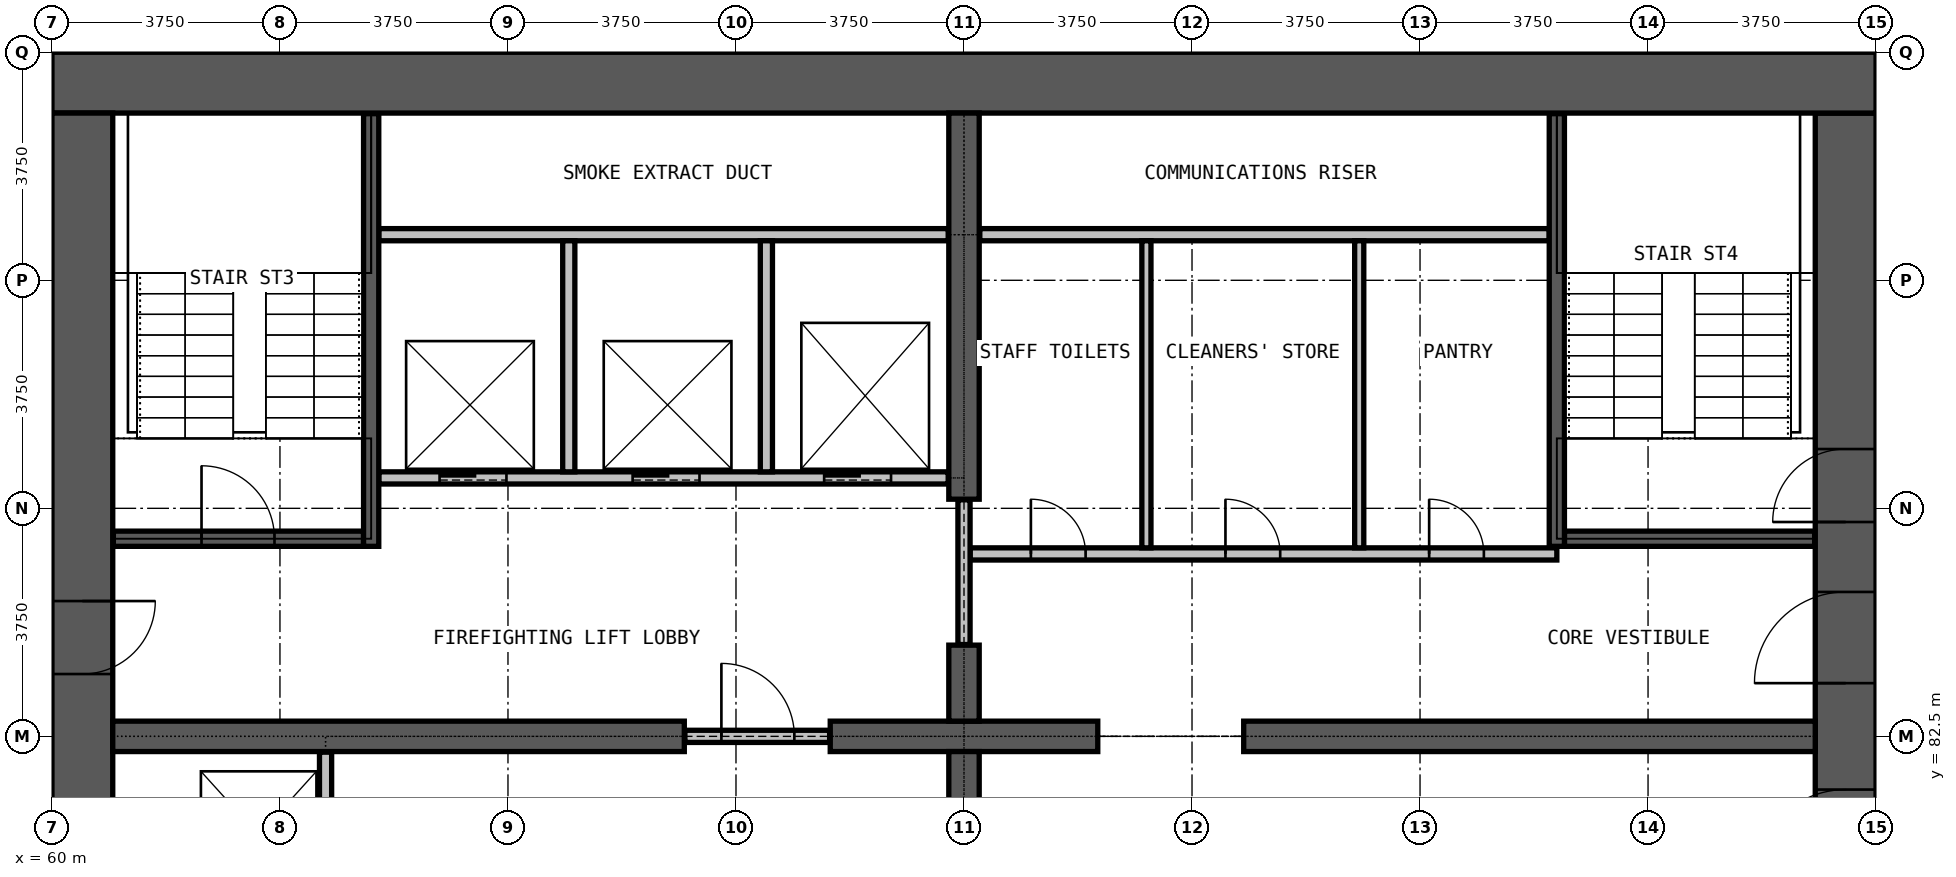
"""IFC4 building model, lengths in metres.
Left out: names, types, materials, properties, quantities, classifications, styles, units other than length and angle.
Written with IfcOpenShell. Run it as: python <this file> out.ifc"""

import sys

from ifc_helpers import new_model, si_unit, direction, frame, frame_2d, origin, place, context, subcontext, project, spatial, rectangle, extrude, element, fill, save


model = new_model("IFC4")
c1 = context("Model", 3, precision=1e-05, world=origin(), true_north=direction((0.0, 1.0)))
c2 = subcontext(c1, "Body", "Model", "MODEL_VIEW")
j1 = project(units=[si_unit("LENGTHUNIT", "METRE"), si_unit("PLANEANGLEUNIT", "RADIAN")], contexts=[c1])
p1 = place(None, origin())
s1 = spatial("IfcSite", under=j1, at=p1, CompositionType="ELEMENT")
p2 = place(p1, origin())
s2 = spatial("IfcBuilding", under=s1, at=p2, CompositionType="ELEMENT")
p3 = place(p2, frame((0.0, 0.0, 24.0)))
s3 = spatial("IfcBuildingStorey", under=s2, at=p3, CompositionType="ELEMENT", Elevation=24.0)
p4 = place(p3, frame((89.5, 72.25, 0.0), z_axis=(0.0, 0.0, 1.0), x_axis=(0.0, 1.0, 0.0)))
e1 = element("IfcWall", 1, at=p4, inside=s3, PredefinedType="SHEAR", context=c2, shape_type="SweptSolid", body=[
    extrude(rectangle(XDim=20.5, YDim=1.0, at=frame_2d((10.25, 0.0))), origin(), (0.0, 0.0, 1.0), 6.0),
])
p5 = place(p4, frame((0.275, 0.0, 0.0)))
e2 = element("IfcOpeningElement", 2, at=p5, cuts=e1, PredefinedType="OPENING", context=c2, shape_type="SweptSolid", body=[
    extrude(rectangle(XDim=1.2, YDim=2.2, at=frame_2d((0.6, 1.1))), frame((0.0, 0.51, 0.0), z_axis=(0.0, -1.0, 0.0), x_axis=(1.0, 0.0, 0.0)), (0.0, 0.0, 1.0), 1.02),
])
p6 = place(p4, frame((13.775, 0.0, 0.0)))
e3 = element("IfcOpeningElement", 3, at=p6, cuts=e1, PredefinedType="OPENING", context=c2, shape_type="SweptSolid", body=[
    extrude(rectangle(XDim=1.2, YDim=2.2, at=frame_2d((0.6, 1.1))), frame((0.0, 0.51, 0.0), z_axis=(0.0, -1.0, 0.0), x_axis=(1.0, 0.0, 0.0)), (0.0, 0.0, 1.0), 1.02),
])
p7 = place(p4, frame((7.875, 0.0, 0.0)))
e4 = element("IfcOpeningElement", 4, at=p7, cuts=e1, PredefinedType="OPENING", context=c2, shape_type="SweptSolid", body=[
    extrude(rectangle(XDim=1.5, YDim=2.2, at=frame_2d((0.75, 1.1))), frame((0.0, 0.51, 0.0), z_axis=(0.0, -1.0, 0.0), x_axis=(1.0, 0.0, 0.0)), (0.0, 0.0, 1.0), 1.02),
])
p8 = place(p4, frame((11.125, 0.0, 0.0)))
e5 = element("IfcOpeningElement", 5, at=p8, cuts=e1, PredefinedType="OPENING", context=c2, shape_type="SweptSolid", body=[
    extrude(rectangle(XDim=1.5, YDim=2.2, at=frame_2d((0.75, 1.1))), frame((0.0, 0.51, 0.0), z_axis=(0.0, -1.0, 0.0), x_axis=(1.0, 0.0, 0.0)), (0.0, 0.0, 1.0), 1.02),
])
p9 = place(p3, frame((90.0, 93.25, 0.0), z_axis=(0.0, 0.0, 1.0), x_axis=(-1.0, 0.0, 0.0)))
e6 = element("IfcWall", 6, at=p9, inside=s3, PredefinedType="SHEAR", context=c2, shape_type="SweptSolid", body=[
    extrude(rectangle(XDim=30.0, YDim=1.0, at=frame_2d((15.0, 0.0))), origin(), (0.0, 0.0, 1.0), 6.0),
])
p10 = place(p3, frame((60.5, 92.75, 0.0), z_axis=(0.0, 0.0, 1.0), x_axis=(0.0, -1.0, 0.0)))
e7 = element("IfcWall", 7, at=p10, inside=s3, PredefinedType="SHEAR", context=c2, shape_type="SweptSolid", body=[
    extrude(rectangle(XDim=20.5, YDim=1.0, at=frame_2d((10.25, 0.0))), origin(), (0.0, 0.0, 1.0), 6.0),
])
p11 = place(p10, frame((19.025, 0.0, 0.0)))
e8 = element("IfcOpeningElement", 8, at=p11, cuts=e7, PredefinedType="OPENING", context=c2, shape_type="SweptSolid", body=[
    extrude(rectangle(XDim=1.2, YDim=2.2, at=frame_2d((0.6, 1.1))), frame((0.0, 0.51, 0.0), z_axis=(0.0, -1.0, 0.0), x_axis=(1.0, 0.0, 0.0)), (0.0, 0.0, 1.0), 1.02),
])
p12 = place(p10, frame((8.025, 0.0, 0.0)))
e9 = element("IfcOpeningElement", 9, at=p12, cuts=e7, PredefinedType="OPENING", context=c2, shape_type="SweptSolid", body=[
    extrude(rectangle(XDim=1.2, YDim=2.2, at=frame_2d((0.6, 1.1))), frame((0.0, 0.51, 0.0), z_axis=(0.0, -1.0, 0.0), x_axis=(1.0, 0.0, 0.0)), (0.0, 0.0, 1.0), 1.02),
])
p13 = place(p3, frame((61.0, 82.5, 0.0), z_axis=(0.0, 0.0, 1.0), x_axis=(1.0, 0.0, 0.0)))
e10 = element("IfcWall", 10, at=p13, inside=s3, PredefinedType="SHEAR", context=c2, shape_type="SweptSolid", body=[
    extrude(rectangle(XDim=9.4, YDim=0.5, at=frame_2d((4.7, 0.0))), origin(), (0.0, 0.0, 1.0), 6.0),
])
p14 = place(p3, frame((72.8, 82.5, 0.0), z_axis=(0.0, 0.0, 1.0), x_axis=(1.0, 0.0, 0.0)))
e11 = element("IfcWall", 11, at=p14, inside=s3, PredefinedType="SHEAR", context=c2, shape_type="SweptSolid", body=[
    extrude(rectangle(XDim=4.4, YDim=0.5, at=frame_2d((2.2, 0.0))), origin(), (0.0, 0.0, 1.0), 6.0),
])
p15 = place(p3, frame((79.6, 82.5, 0.0), z_axis=(0.0, 0.0, 1.0), x_axis=(1.0, 0.0, 0.0)))
e12 = element("IfcWall", 12, at=p15, inside=s3, PredefinedType="SHEAR", context=c2, shape_type="SweptSolid", body=[
    extrude(rectangle(XDim=9.4, YDim=0.5, at=frame_2d((4.7, 0.0))), origin(), (0.0, 0.0, 1.0), 6.0),
])
for number, where, z_axis, x_axis in (
    (13, (75.0, 81.0, 0.0), (0.0, 0.0, 1.0), (0.0, 1.0, 0.0)),
    (14, (75.0, 82.75, 0.0), (0.0, 0.0, 1.0), (0.0, 1.0, 0.0)),
):
    element("IfcWall", number, at=place(p3, frame(where, z_axis=z_axis, x_axis=x_axis)), inside=s3, PredefinedType="SHEAR", context=c2, shape_type="SweptSolid", body=[
        extrude(rectangle(XDim=1.25, YDim=0.5, at=frame_2d((0.625, 0.0))), origin(), (0.0, 0.0, 1.0), 6.0),
    ])
p16 = place(p3, frame((75.0, 86.4, 0.0), z_axis=(0.0, 0.0, 1.0), x_axis=(0.0, 1.0, 0.0)))
e15 = element("IfcWall", 15, at=p16, inside=s3, PredefinedType="SHEAR", context=c2, shape_type="SweptSolid", body=[
    extrude(rectangle(XDim=6.35, YDim=0.5, at=frame_2d((3.175, 0.0))), origin(), (0.0, 0.0, 1.0), 6.0),
])
p17 = place(p3, frame((70.41, 82.5, 0.0), z_axis=(0.0, 0.0, 1.0), x_axis=(1.0, 0.0, 0.0)))
e16 = element("IfcWall", 16, at=p17, inside=s3, PredefinedType="PARTITIONING", context=c2, shape_type="SweptSolid", body=[
    extrude(rectangle(XDim=2.38, YDim=0.2, at=frame_2d((1.19, 0.0))), origin(), (0.0, 0.0, 1.0), 2.4),
])
p18 = place(p17, frame((0.6, 0.0, 0.0)))
e17 = element("IfcOpeningElement", 17, at=p18, cuts=e16, PredefinedType="OPENING", context=c2, shape_type="SweptSolid", body=[
    extrude(rectangle(XDim=1.2, YDim=2.2, at=frame_2d((0.6, 1.1))), frame((0.0, 0.11, 0.0), z_axis=(0.0, -1.0, 0.0), x_axis=(1.0, 0.0, 0.0)), (0.0, 0.0, 1.0), 0.22),
])
p19 = place(p3, frame((75.1, 85.5, 0.0), z_axis=(0.0, 0.0, 1.0), x_axis=(1.0, 0.0, 0.0)))
e18 = element("IfcWall", 18, at=p19, inside=s3, PredefinedType="PARTITIONING", context=c2, shape_type="SweptSolid", body=[
    extrude(rectangle(XDim=9.65, YDim=0.2, at=frame_2d((4.825, 0.0))), origin(), (0.0, 0.0, 1.0), 5.65),
])
p20 = place(p19, frame((1.0, 0.0, 0.0)))
e19 = element("IfcOpeningElement", 19, at=p20, cuts=e18, PredefinedType="OPENING", context=c2, shape_type="SweptSolid", body=[
    extrude(rectangle(XDim=0.9, YDim=2.2, at=frame_2d((0.45, 1.1))), frame((0.0, 0.11, 0.0), z_axis=(0.0, -1.0, 0.0), x_axis=(1.0, 0.0, 0.0)), (0.0, 0.0, 1.0), 0.22),
])
p21 = place(p19, frame((4.2, 0.0, 0.0)))
e20 = element("IfcOpeningElement", 20, at=p21, cuts=e18, PredefinedType="OPENING", context=c2, shape_type="SweptSolid", body=[
    extrude(rectangle(XDim=0.9, YDim=2.2, at=frame_2d((0.45, 1.1))), frame((0.0, 0.11, 0.0), z_axis=(0.0, -1.0, 0.0), x_axis=(1.0, 0.0, 0.0)), (0.0, 0.0, 1.0), 0.22),
])
p22 = place(p19, frame((7.55, 0.0, 0.0)))
e21 = element("IfcOpeningElement", 21, at=p22, cuts=e18, PredefinedType="OPENING", context=c2, shape_type="SweptSolid", body=[
    extrude(rectangle(XDim=0.9, YDim=2.2, at=frame_2d((0.45, 1.1))), frame((0.0, 0.11, 0.0), z_axis=(0.0, -1.0, 0.0), x_axis=(1.0, 0.0, 0.0)), (0.0, 0.0, 1.0), 0.22),
])
p23 = place(p3, frame((75.26, 90.75, 0.0), z_axis=(0.0, 0.0, 1.0), x_axis=(1.0, 0.0, 0.0)))
e22 = element("IfcWall", 22, at=p23, inside=s3, PredefinedType="PARTITIONING", context=c2, shape_type="SweptSolid", body=[
    extrude(rectangle(XDim=9.365, YDim=0.2, at=frame_2d((4.683, 0.0))), origin(), (0.0, 0.0, 1.0), 5.65),
])
p24 = place(p3, frame((75.0, 84.01, 0.0), z_axis=(0.0, 0.0, 1.0), x_axis=(0.0, 1.0, 0.0)))
e23 = element("IfcWall", 23, at=p24, inside=s3, PredefinedType="PARTITIONING", context=c2, shape_type="SweptSolid", body=[
    extrude(rectangle(XDim=2.38, YDim=0.2, at=frame_2d((1.19, 0.0))), origin(), (0.0, 0.0, 1.0), 2.4),
])
for number, where, z_axis, x_axis in (
    (24, (78.0, 85.6, 0.0), (0.0, 0.0, 1.0), (0.0, 1.0, 0.0)),
    (25, (81.5, 85.6, 0.0), (0.0, 0.0, 1.0), (0.0, 1.0, 0.0)),
):
    element("IfcWall", number, at=place(p3, frame(where, z_axis=z_axis, x_axis=x_axis)), inside=s3, PredefinedType="PARTITIONING", context=c2, shape_type="SweptSolid", body=[
        extrude(rectangle(XDim=5.05, YDim=0.15, at=frame_2d((2.525, 0.0))), origin(), (0.0, 0.0, 1.0), 5.65),
    ])
p25 = place(p3, frame((65.375, 86.75, 0.0), z_axis=(0.0, 0.0, 1.0), x_axis=(1.0, 0.0, 0.0)))
e26 = element("IfcWall", 26, at=p25, inside=s3, PredefinedType="PARTITIONING", context=c2, shape_type="SweptSolid", body=[
    extrude(rectangle(XDim=9.365, YDim=0.2, at=frame_2d((4.683, 0.0))), origin(), (0.0, 0.0, 1.0), 5.65),
])
p26 = place(p25, frame((1.0, 0.0, 0.0)))
e27 = element("IfcOpeningElement", 27, at=p26, cuts=e26, PredefinedType="OPENING", context=c2, shape_type="SweptSolid", body=[
    extrude(rectangle(XDim=1.1, YDim=2.2, at=frame_2d((0.55, 1.1))), frame((0.0, 0.11, 0.0), z_axis=(0.0, -1.0, 0.0), x_axis=(1.0, 0.0, 0.0)), (0.0, 0.0, 1.0), 0.22),
])
p27 = place(p25, frame((4.175, 0.0, 0.0)))
e28 = element("IfcOpeningElement", 28, at=p27, cuts=e26, PredefinedType="OPENING", context=c2, shape_type="SweptSolid", body=[
    extrude(rectangle(XDim=1.1, YDim=2.2, at=frame_2d((0.55, 1.1))), frame((0.0, 0.11, 0.0), z_axis=(0.0, -1.0, 0.0), x_axis=(1.0, 0.0, 0.0)), (0.0, 0.0, 1.0), 0.22),
])
p28 = place(p25, frame((7.325, 0.0, 0.0)))
e29 = element("IfcOpeningElement", 29, at=p28, cuts=e26, PredefinedType="OPENING", context=c2, shape_type="SweptSolid", body=[
    extrude(rectangle(XDim=1.1, YDim=2.2, at=frame_2d((0.55, 1.1))), frame((0.0, 0.11, 0.0), z_axis=(0.0, -1.0, 0.0), x_axis=(1.0, 0.0, 0.0)), (0.0, 0.0, 1.0), 0.22),
])
p29 = place(p3, frame((65.375, 90.75, 0.0), z_axis=(0.0, 0.0, 1.0), x_axis=(1.0, 0.0, 0.0)))
e30 = element("IfcWall", 30, at=p29, inside=s3, PredefinedType="PARTITIONING", context=c2, shape_type="SweptSolid", body=[
    extrude(rectangle(XDim=9.365, YDim=0.2, at=frame_2d((4.683, 0.0))), origin(), (0.0, 0.0, 1.0), 5.65),
])
p30 = place(p3, frame((64.5, 79.375, 0.0), z_axis=(0.0, 0.0, 1.0), x_axis=(0.0, 1.0, 0.0)))
e31 = element("IfcWall", 31, at=p30, inside=s3, PredefinedType="PARTITIONING", context=c2, shape_type="SweptSolid", body=[
    extrude(rectangle(XDim=2.865, YDim=0.2, at=frame_2d((1.433, 0.0))), origin(), (0.0, 0.0, 1.0), 5.65),
])
for number, where, z_axis, x_axis in (
    (32, (68.5, 86.85, 0.0), (0.0, 0.0, 1.0), (0.0, 1.0, 0.0)),
    (33, (71.75, 86.85, 0.0), (0.0, 0.0, 1.0), (0.0, 1.0, 0.0)),
):
    element("IfcWall", number, at=place(p3, frame(where, z_axis=z_axis, x_axis=x_axis)), inside=s3, PredefinedType="PARTITIONING", context=c2, shape_type="SweptSolid", body=[
        extrude(rectangle(XDim=3.8, YDim=0.2, at=frame_2d((1.9, 0.0))), origin(), (0.0, 0.0, 1.0), 5.65),
    ])
p31 = place(p3, frame((61.01, 85.75, 0.0), z_axis=(0.0, 0.0, 1.0), x_axis=(1.0, 0.0, 0.0)))
e34 = element("IfcWall", 34, at=p31, inside=s3, PredefinedType="PARTITIONING", context=c2, shape_type="SweptSolid", body=[
    extrude(rectangle(XDim=4.115, YDim=0.25, at=frame_2d((2.058, 0.0))), origin(), (0.0, 0.0, 1.0), 5.65),
])
p32 = place(p31, frame((1.45, 0.0, 0.0)))
e35 = element("IfcOpeningElement", 35, at=p32, cuts=e34, PredefinedType="OPENING", context=c2, shape_type="SweptSolid", body=[
    extrude(rectangle(XDim=1.2, YDim=2.2, at=frame_2d((0.6, 1.1))), frame((0.0, 0.135, 0.0), z_axis=(0.0, -1.0, 0.0), x_axis=(1.0, 0.0, 0.0)), (0.0, 0.0, 1.0), 0.27),
])
p33 = place(p3, frame((84.875, 85.75, 0.0), z_axis=(0.0, 0.0, 1.0), x_axis=(1.0, 0.0, 0.0)))
e36 = element("IfcWall", 36, at=p33, inside=s3, PredefinedType="PARTITIONING", context=c2, shape_type="SweptSolid", body=[
    extrude(rectangle(XDim=4.115, YDim=0.25, at=frame_2d((2.058, 0.0))), origin(), (0.0, 0.0, 1.0), 5.65),
])
for number, where, z_axis, x_axis in (
    (37, (65.25, 85.625, 0.0), (0.0, 0.0, 1.0), (0.0, 1.0, 0.0)),
    (38, (84.75, 85.625, 0.0), (0.0, 0.0, 1.0), (0.0, 1.0, 0.0)),
):
    element("IfcWall", number, at=place(p3, frame(where, z_axis=z_axis, x_axis=x_axis)), inside=s3, PredefinedType="PARTITIONING", context=c2, shape_type="SweptSolid", body=[
        extrude(rectangle(XDim=7.115, YDim=0.25, at=frame_2d((3.558, 0.0))), origin(), (0.0, 0.0, 1.0), 5.65),
    ])
p34 = place(p26, origin())
e39 = element("IfcDoor", 39, at=p34, inside=s3, OperationType="DOUBLE_DOOR_SLIDING", PredefinedType="DOOR", context=c2, shape_type="SweptSolid", body=[
    extrude(rectangle(XDim=1.1, YDim=2.2, at=frame_2d((0.55, 1.1))), frame((0.0, 0.025, 0.0), z_axis=(0.0, -1.0, 0.0), x_axis=(1.0, 0.0, 0.0)), (0.0, 0.0, 1.0), 0.05),
])
fill(e27, e39)
p35 = place(p27, origin())
e40 = element("IfcDoor", 40, at=p35, inside=s3, OperationType="DOUBLE_DOOR_SLIDING", PredefinedType="DOOR", context=c2, shape_type="SweptSolid", body=[
    extrude(rectangle(XDim=1.1, YDim=2.2, at=frame_2d((0.55, 1.1))), frame((0.0, 0.025, 0.0), z_axis=(0.0, -1.0, 0.0), x_axis=(1.0, 0.0, 0.0)), (0.0, 0.0, 1.0), 0.05),
])
fill(e28, e40)
p36 = place(p28, origin())
e41 = element("IfcDoor", 41, at=p36, inside=s3, OperationType="DOUBLE_DOOR_SLIDING", PredefinedType="DOOR", context=c2, shape_type="SweptSolid", body=[
    extrude(rectangle(XDim=1.1, YDim=2.2, at=frame_2d((0.55, 1.1))), frame((0.0, 0.025, 0.0), z_axis=(0.0, -1.0, 0.0), x_axis=(1.0, 0.0, 0.0)), (0.0, 0.0, 1.0), 0.05),
])
fill(e29, e41)
p37 = place(p18, origin())
e42 = element("IfcDoor", 42, at=p37, inside=s3, OperationType="SINGLE_SWING_LEFT", PredefinedType="DOOR", context=c2, shape_type="SweptSolid", body=[
    extrude(rectangle(XDim=1.2, YDim=2.2, at=frame_2d((0.6, 1.1))), frame((0.0, 0.025, 0.0), z_axis=(0.0, -1.0, 0.0), x_axis=(1.0, 0.0, 0.0)), (0.0, 0.0, 1.0), 0.05),
])
fill(e17, e42)
p38 = place(p32, origin())
e43 = element("IfcDoor", 43, at=p38, inside=s3, OperationType="SINGLE_SWING_LEFT", PredefinedType="DOOR", context=c2, shape_type="SweptSolid", body=[
    extrude(rectangle(XDim=1.2, YDim=2.2, at=frame_2d((0.6, 1.1))), frame((0.0, 0.025, 0.0), z_axis=(0.0, -1.0, 0.0), x_axis=(1.0, 0.0, 0.0)), (0.0, 0.0, 1.0), 0.05),
])
fill(e35, e43)
p39 = place(p6, origin())
e44 = element("IfcDoor", 44, at=p39, inside=s3, OperationType="SINGLE_SWING_LEFT", PredefinedType="DOOR", context=c2, shape_type="SweptSolid", body=[
    extrude(rectangle(XDim=1.2, YDim=2.2, at=frame_2d((0.6, 1.1))), frame((0.0, 0.025, 0.0), z_axis=(0.0, -1.0, 0.0), x_axis=(1.0, 0.0, 0.0)), (0.0, 0.0, 1.0), 0.05),
])
fill(e3, e44)
p40 = place(p7, origin())
e45 = element("IfcDoor", 45, at=p40, inside=s3, OperationType="DOUBLE_DOOR_SINGLE_SWING", PredefinedType="DOOR", context=c2, shape_type="SweptSolid", body=[
    extrude(rectangle(XDim=1.5, YDim=2.2, at=frame_2d((0.75, 1.1))), frame((0.0, 0.025, 0.0), z_axis=(0.0, -1.0, 0.0), x_axis=(1.0, 0.0, 0.0)), (0.0, 0.0, 1.0), 0.05),
])
fill(e4, e45)
p41 = place(p12, origin())
e46 = element("IfcDoor", 46, at=p41, inside=s3, OperationType="SINGLE_SWING_RIGHT", PredefinedType="DOOR", context=c2, shape_type="SweptSolid", body=[
    extrude(rectangle(XDim=1.2, YDim=2.2, at=frame_2d((0.6, 1.1))), frame((0.0, 0.025, 0.0), z_axis=(0.0, -1.0, 0.0), x_axis=(1.0, 0.0, 0.0)), (0.0, 0.0, 1.0), 0.05),
])
fill(e9, e46)
p42 = place(p8, origin())
e47 = element("IfcDoor", 47, at=p42, inside=s3, OperationType="DOUBLE_DOOR_SINGLE_SWING", PredefinedType="DOOR", context=c2, shape_type="SweptSolid", body=[
    extrude(rectangle(XDim=1.5, YDim=2.2, at=frame_2d((0.75, 1.1))), frame((0.0, 0.025, 0.0), z_axis=(0.0, -1.0, 0.0), x_axis=(1.0, 0.0, 0.0)), (0.0, 0.0, 1.0), 0.05),
])
fill(e5, e47)
p43 = place(p20, origin())
e48 = element("IfcDoor", 48, at=p43, inside=s3, OperationType="SINGLE_SWING_LEFT", PredefinedType="DOOR", context=c2, shape_type="SweptSolid", body=[
    extrude(rectangle(XDim=0.9, YDim=2.2, at=frame_2d((0.45, 1.1))), frame((0.0, 0.025, 0.0), z_axis=(0.0, -1.0, 0.0), x_axis=(1.0, 0.0, 0.0)), (0.0, 0.0, 1.0), 0.05),
])
fill(e19, e48)
p44 = place(p21, origin())
e49 = element("IfcDoor", 49, at=p44, inside=s3, OperationType="SINGLE_SWING_LEFT", PredefinedType="DOOR", context=c2, shape_type="SweptSolid", body=[
    extrude(rectangle(XDim=0.9, YDim=2.2, at=frame_2d((0.45, 1.1))), frame((0.0, 0.025, 0.0), z_axis=(0.0, -1.0, 0.0), x_axis=(1.0, 0.0, 0.0)), (0.0, 0.0, 1.0), 0.05),
])
fill(e20, e49)
p45 = place(p22, origin())
e50 = element("IfcDoor", 50, at=p45, inside=s3, OperationType="SINGLE_SWING_RIGHT", PredefinedType="DOOR", context=c2, shape_type="SweptSolid", body=[
    extrude(rectangle(XDim=0.9, YDim=2.2, at=frame_2d((0.45, 1.1))), frame((0.0, 0.025, 0.0), z_axis=(0.0, -1.0, 0.0), x_axis=(1.0, 0.0, 0.0)), (0.0, 0.0, 1.0), 0.05),
])
fill(e21, e50)
save(model, sys.argv[1])
